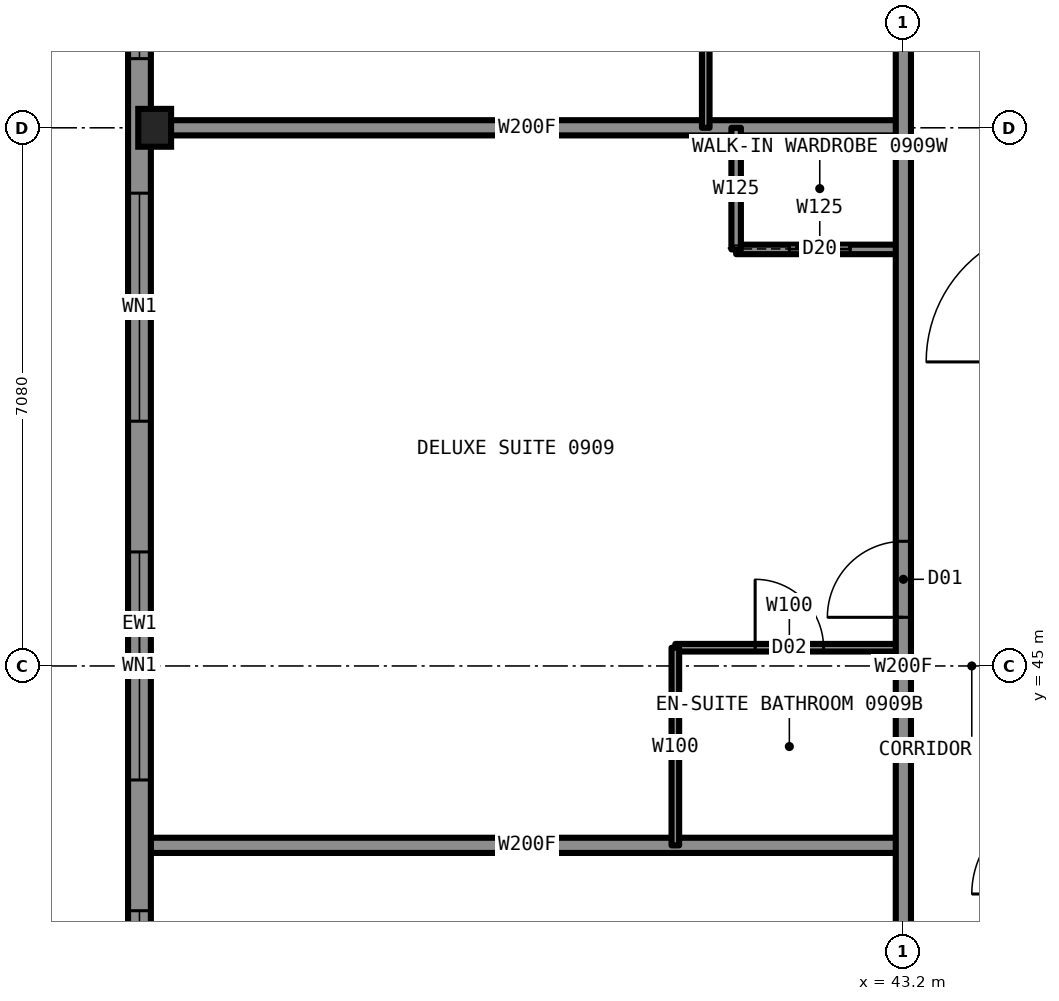
"""IFC4 building model, lengths in metres.
Left out: names, types, materials, properties, quantities, classifications, styles, units other than length and angle.
Written with IfcOpenShell. Run it as: python <this file> out.ifc"""

import sys

from ifc_helpers import new_model, si_unit, direction, frame, frame_2d, origin, origin_2d, place, context, subcontext, project, spatial, rectangle, i_section, extrude, element, fill, save


model = new_model("IFC4")
c1 = context("Model", 3, precision=1e-05, world=origin(), true_north=direction((0.0, 1.0)))
c2 = subcontext(c1, "Body", "Model", "MODEL_VIEW")
j1 = project(units=[si_unit("LENGTHUNIT", "METRE"), si_unit("PLANEANGLEUNIT", "RADIAN")], contexts=[c1])
p1 = place(None, origin())
s1 = spatial("IfcSite", under=j1, at=p1, CompositionType="ELEMENT")
p2 = place(p1, origin())
s2 = spatial("IfcBuilding", under=s1, at=p2, CompositionType="ELEMENT")
p3 = place(p2, frame((0.0, 0.0, 39.0)))
s3 = spatial("IfcBuildingStorey", under=s2, at=p3, CompositionType="ELEMENT", Elevation=39.0)
p4 = place(p3, frame((33.35, 52.08, 0.0), z_axis=(0.0, 0.0, 1.0), x_axis=(1.0, 0.0, 0.0)))
e1 = element("IfcColumn", 1, at=p4, inside=s3, PredefinedType="COLUMN", context=c2, shape_type="SweptSolid", body=[
    extrude(i_section(OverallWidth=0.432, OverallDepth=0.498, WebThickness=0.056, FlangeThickness=0.089, at=origin_2d()), origin(), (0.0, 0.0, 1.0), 3.5),
])
p5 = place(p3, frame((33.3, 42.64, 0.0), z_axis=(0.0, 0.0, 1.0), x_axis=(1.0, 0.0, 0.0)))
e2 = element("IfcWall", 2, at=p5, inside=s3, PredefinedType="PARTITIONING", context=c2, shape_type="SweptSolid", body=[
    extrude(rectangle(XDim=9.9, YDim=0.2, at=frame_2d((4.95, 0.0))), origin(), (0.0, 0.0, 1.0), 2.723),
])
p6 = place(p3, frame((40.2, 45.24, 0.0), z_axis=(0.0, 0.0, 1.0), x_axis=(1.0, 0.0, 0.0)))
e3 = element("IfcWall", 3, at=p6, inside=s3, PredefinedType="PARTITIONING", context=c2, shape_type="SweptSolid", body=[
    extrude(rectangle(XDim=3.0, YDim=0.1, at=frame_2d((1.5, 0.0))), origin(), (0.0, 0.0, 1.0), 3.33),
])
p7 = place(p6, frame((1.05, 0.0, 0.0)))
e4 = element("IfcOpeningElement", 4, at=p7, cuts=e3, PredefinedType="OPENING", context=c2, shape_type="SweptSolid", body=[
    extrude(rectangle(XDim=0.9, YDim=2.1, at=frame_2d((0.45, 1.05))), frame((0.0, 0.06, 0.0), z_axis=(0.0, -1.0, 0.0), x_axis=(1.0, 0.0, 0.0)), (0.0, 0.0, 1.0), 0.12),
])
p8 = place(p3, frame((41.0, 50.48, 0.0), z_axis=(0.0, 0.0, 1.0), x_axis=(1.0, 0.0, 0.0)))
e5 = element("IfcWall", 5, at=p8, inside=s3, PredefinedType="PARTITIONING", context=c2, shape_type="SweptSolid", body=[
    extrude(rectangle(XDim=2.2, YDim=0.125, at=frame_2d((1.1, 0.0))), origin(), (0.0, 0.0, 1.0), 3.33),
])
p9 = place(p8, frame((0.7, 0.0, 0.0)))
e6 = element("IfcOpeningElement", 6, at=p9, cuts=e5, PredefinedType="OPENING", context=c2, shape_type="SweptSolid", body=[
    extrude(rectangle(XDim=0.8, YDim=2.1, at=frame_2d((0.4, 1.05))), frame((0.0, 0.073, 0.0), z_axis=(0.0, -1.0, 0.0), x_axis=(1.0, 0.0, 0.0)), (0.0, 0.0, 1.0), 0.145),
])
p10 = place(p3, frame((33.3, 52.08, 0.0), z_axis=(0.0, 0.0, 1.0), x_axis=(1.0, 0.0, 0.0)))
e7 = element("IfcWall", 7, at=p10, inside=s3, PredefinedType="PARTITIONING", context=c2, shape_type="SweptSolid", body=[
    extrude(rectangle(XDim=9.9, YDim=0.2, at=frame_2d((4.95, 0.0))), origin(), (0.0, 0.0, 1.0), 2.573),
])
p11 = place(p3, frame((43.2, 33.2, 0.0), z_axis=(0.0, 0.0, 1.0), x_axis=(0.0, 1.0, 0.0)))
e8 = element("IfcWall", 8, at=p11, inside=s3, PredefinedType="PARTITIONING", context=c2, shape_type="SweptSolid", body=[
    extrude(rectangle(XDim=23.58, YDim=0.2, at=frame_2d((11.79, 0.0))), origin(), (0.0, 0.0, 1.0), 3.33),
])
p12 = place(p11, frame((7.27, 0.0, 0.0)))
e9 = element("IfcOpeningElement", 9, at=p12, cuts=e8, PredefinedType="OPENING", context=c2, shape_type="SweptSolid", body=[
    extrude(rectangle(XDim=1.0, YDim=2.2, at=frame_2d((0.5, 1.1))), frame((0.0, 0.11, 0.0), z_axis=(0.0, -1.0, 0.0), x_axis=(1.0, 0.0, 0.0)), (0.0, 0.0, 1.0), 0.22),
])
p13 = place(p11, frame((12.44, 0.0, 0.0)))
e10 = element("IfcOpeningElement", 10, at=p13, cuts=e8, PredefinedType="OPENING", context=c2, shape_type="SweptSolid", body=[
    extrude(rectangle(XDim=1.0, YDim=2.2, at=frame_2d((0.5, 1.1))), frame((0.0, 0.11, 0.0), z_axis=(0.0, -1.0, 0.0), x_axis=(1.0, 0.0, 0.0)), (0.0, 0.0, 1.0), 0.22),
])
p14 = place(p11, frame((21.84, 0.0, 0.0)))
e11 = element("IfcOpeningElement", 11, at=p14, cuts=e8, PredefinedType="OPENING", context=c2, shape_type="SweptSolid", body=[
    extrude(rectangle(XDim=1.1, YDim=2.2, at=frame_2d((0.55, 1.1))), frame((0.0, 0.11, 0.0), z_axis=(0.0, -1.0, 0.0), x_axis=(1.0, 0.0, 0.0)), (0.0, 0.0, 1.0), 0.22),
])
p15 = place(p11, frame((0.66, 0.0, 0.0)))
e12 = element("IfcOpeningElement", 12, at=p15, cuts=e8, PredefinedType="OPENING", context=c2, shape_type="SweptSolid", body=[
    extrude(rectangle(XDim=1.1, YDim=2.2, at=frame_2d((0.55, 1.1))), frame((0.0, 0.11, 0.0), z_axis=(0.0, -1.0, 0.0), x_axis=(1.0, 0.0, 0.0)), (0.0, 0.0, 1.0), 0.22),
])
p16 = place(p3, frame((41.0, 50.48, 0.0), z_axis=(0.0, 0.0, 1.0), x_axis=(0.0, 1.0, 0.0)))
e13 = element("IfcWall", 13, at=p16, inside=s3, PredefinedType="PARTITIONING", context=c2, shape_type="SweptSolid", body=[
    extrude(rectangle(XDim=1.6, YDim=0.125, at=frame_2d((0.8, 0.0))), origin(), (0.0, 0.0, 1.0), 3.33),
])
p17 = place(p3, frame((40.6, 52.08, 0.0), z_axis=(0.0, 0.0, 1.0), x_axis=(0.0, 1.0, 0.0)))
e14 = element("IfcWall", 14, at=p17, inside=s3, PredefinedType="PARTITIONING", context=c2, shape_type="SweptSolid", body=[
    extrude(rectangle(XDim=2.6, YDim=0.1, at=frame_2d((1.3, 0.0))), origin(), (0.0, 0.0, 1.0), 3.33),
])
p18 = place(p3, frame((40.2, 42.64, 0.0), z_axis=(0.0, 0.0, 1.0), x_axis=(0.0, 1.0, 0.0)))
e15 = element("IfcWall", 15, at=p18, inside=s3, PredefinedType="PARTITIONING", context=c2, shape_type="SweptSolid", body=[
    extrude(rectangle(XDim=2.6, YDim=0.1, at=frame_2d((1.3, 0.0))), origin(), (0.0, 0.0, 1.0), 3.33),
])
p19 = place(p3, frame((33.15, 61.5, 0.0), z_axis=(0.0, 0.0, 1.0), x_axis=(0.0, -1.0, 0.0)))
e16 = element("IfcWall", 16, at=p19, inside=s3, PredefinedType="SOLIDWALL", context=c2, shape_type="SweptSolid", body=[
    extrude(rectangle(XDim=33.0, YDim=0.3, at=frame_2d((16.5, 0.0))), origin(), (0.0, 0.0, 1.0), 2.83),
])
p20 = place(p19, frame((0.85, 0.0, 0.5)))
e17 = element("IfcOpeningElement", 17, at=p20, cuts=e16, PredefinedType="OPENING", context=c2, shape_type="SweptSolid", body=[
    extrude(rectangle(XDim=2.5, YDim=2.0, at=frame_2d((1.25, 1.0))), frame((0.0, 0.16, 0.0), z_axis=(0.0, -1.0, 0.0), x_axis=(1.0, 0.0, 0.0)), (0.0, 0.0, 1.0), 0.32),
])
p21 = place(p19, frame((6.61, 0.0, 0.5)))
e18 = element("IfcOpeningElement", 18, at=p21, cuts=e16, PredefinedType="OPENING", context=c2, shape_type="SweptSolid", body=[
    extrude(rectangle(XDim=1.9, YDim=1.9, at=frame_2d((0.95, 0.95))), frame((0.0, 0.16, 0.0), z_axis=(0.0, -1.0, 0.0), x_axis=(1.0, 0.0, 0.0)), (0.0, 0.0, 1.0), 0.32),
])
p22 = place(p19, frame((10.28, 0.0, 0.5)))
e19 = element("IfcOpeningElement", 19, at=p22, cuts=e16, PredefinedType="OPENING", context=c2, shape_type="SweptSolid", body=[
    extrude(rectangle(XDim=3.0, YDim=2.0, at=frame_2d((1.5, 1.0))), frame((0.0, 0.16, 0.0), z_axis=(0.0, -1.0, 0.0), x_axis=(1.0, 0.0, 0.0)), (0.0, 0.0, 1.0), 0.32),
])
p23 = place(p19, frame((15.0, 0.0, 0.5)))
e20 = element("IfcOpeningElement", 20, at=p23, cuts=e16, PredefinedType="OPENING", context=c2, shape_type="SweptSolid", body=[
    extrude(rectangle(XDim=3.0, YDim=2.0, at=frame_2d((1.5, 1.0))), frame((0.0, 0.16, 0.0), z_axis=(0.0, -1.0, 0.0), x_axis=(1.0, 0.0, 0.0)), (0.0, 0.0, 1.0), 0.32),
])
p24 = place(p19, frame((19.72, 0.0, 0.5)))
e21 = element("IfcOpeningElement", 21, at=p24, cuts=e16, PredefinedType="OPENING", context=c2, shape_type="SweptSolid", body=[
    extrude(rectangle(XDim=3.0, YDim=2.0, at=frame_2d((1.5, 1.0))), frame((0.0, 0.16, 0.0), z_axis=(0.0, -1.0, 0.0), x_axis=(1.0, 0.0, 0.0)), (0.0, 0.0, 1.0), 0.32),
])
p25 = place(p19, frame((24.44, 0.0, 0.5)))
e22 = element("IfcOpeningElement", 22, at=p25, cuts=e16, PredefinedType="OPENING", context=c2, shape_type="SweptSolid", body=[
    extrude(rectangle(XDim=1.9, YDim=1.9, at=frame_2d((0.95, 0.95))), frame((0.0, 0.16, 0.0), z_axis=(0.0, -1.0, 0.0), x_axis=(1.0, 0.0, 0.0)), (0.0, 0.0, 1.0), 0.32),
])
p26 = place(p19, frame((29.6, 0.0, 0.5)))
e23 = element("IfcOpeningElement", 23, at=p26, cuts=e16, PredefinedType="OPENING", context=c2, shape_type="SweptSolid", body=[
    extrude(rectangle(XDim=2.5, YDim=2.0, at=frame_2d((1.25, 1.0))), frame((0.0, 0.16, 0.0), z_axis=(0.0, -1.0, 0.0), x_axis=(1.0, 0.0, 0.0)), (0.0, 0.0, 1.0), 0.32),
])
p27 = place(p19, frame((5.91, 0.0, 0.5)))
e24 = element("IfcOpeningElement", 24, at=p27, cuts=e16, PredefinedType="OPENING", context=c2, shape_type="SweptSolid", body=[
    extrude(rectangle(XDim=0.7, YDim=1.0, at=frame_2d((0.35, 0.5))), frame((0.0, 0.16, 0.0), z_axis=(0.0, -1.0, 0.0), x_axis=(1.0, 0.0, 0.0)), (0.0, 0.0, 1.0), 0.32),
])
p28 = place(p19, frame((26.39, 0.0, 0.5)))
e25 = element("IfcOpeningElement", 25, at=p28, cuts=e16, PredefinedType="OPENING", context=c2, shape_type="SweptSolid", body=[
    extrude(rectangle(XDim=0.7, YDim=1.0, at=frame_2d((0.35, 0.5))), frame((0.0, 0.16, 0.0), z_axis=(0.0, -1.0, 0.0), x_axis=(1.0, 0.0, 0.0)), (0.0, 0.0, 1.0), 0.32),
])
p29 = place(p13, origin())
e26 = element("IfcDoor", 26, at=p29, inside=s3, OperationType="SINGLE_SWING_LEFT", PredefinedType="DOOR", context=c2, shape_type="SweptSolid", body=[
    extrude(rectangle(XDim=1.0, YDim=2.2, at=frame_2d((0.5, 1.1))), frame((0.0, 0.025, 0.0), z_axis=(0.0, -1.0, 0.0), x_axis=(1.0, 0.0, 0.0)), (0.0, 0.0, 1.0), 0.05),
])
fill(e10, e26)
p30 = place(p7, origin())
e27 = element("IfcDoor", 27, at=p30, inside=s3, OperationType="SINGLE_SWING_RIGHT", PredefinedType="DOOR", context=c2, shape_type="SweptSolid", body=[
    extrude(rectangle(XDim=0.9, YDim=2.1, at=frame_2d((0.45, 1.05))), frame((0.0, 0.025, 0.0), z_axis=(0.0, -1.0, 0.0), x_axis=(1.0, 0.0, 0.0)), (0.0, 0.0, 1.0), 0.05),
])
fill(e4, e27)
p31 = place(p9, origin())
e28 = element("IfcDoor", 28, at=p31, inside=s3, OperationType="SLIDING_TO_LEFT", PredefinedType="DOOR", context=c2, shape_type="SweptSolid", body=[
    extrude(rectangle(XDim=0.8, YDim=2.1, at=frame_2d((0.4, 1.05))), frame((0.0, 0.025, 0.0), z_axis=(0.0, -1.0, 0.0), x_axis=(1.0, 0.0, 0.0)), (0.0, 0.0, 1.0), 0.05),
])
fill(e6, e28)
p32 = place(p21, origin())
e29 = element("IfcWindow", 29, at=p32, inside=s3, PartitioningType="SINGLE_PANEL", PredefinedType="WINDOW", context=c2, shape_type="SweptSolid", body=[
    extrude(rectangle(XDim=1.9, YDim=1.9, at=frame_2d((0.95, 0.95))), frame((0.0, 0.03, 0.0), z_axis=(0.0, -1.0, 0.0), x_axis=(1.0, 0.0, 0.0)), (0.0, 0.0, 1.0), 0.06),
])
fill(e18, e29)
p33 = place(p22, origin())
e30 = element("IfcWindow", 30, at=p33, inside=s3, PartitioningType="SINGLE_PANEL", PredefinedType="WINDOW", context=c2, shape_type="SweptSolid", body=[
    extrude(rectangle(XDim=3.0, YDim=2.0, at=frame_2d((1.5, 1.0))), frame((0.0, 0.03, 0.0), z_axis=(0.0, -1.0, 0.0), x_axis=(1.0, 0.0, 0.0)), (0.0, 0.0, 1.0), 0.06),
])
fill(e19, e30)
p34 = place(p23, origin())
e31 = element("IfcWindow", 31, at=p34, inside=s3, PartitioningType="SINGLE_PANEL", PredefinedType="WINDOW", context=c2, shape_type="SweptSolid", body=[
    extrude(rectangle(XDim=3.0, YDim=2.0, at=frame_2d((1.5, 1.0))), frame((0.0, 0.03, 0.0), z_axis=(0.0, -1.0, 0.0), x_axis=(1.0, 0.0, 0.0)), (0.0, 0.0, 1.0), 0.06),
])
fill(e20, e31)
p35 = place(p24, origin())
e32 = element("IfcWindow", 32, at=p35, inside=s3, PartitioningType="SINGLE_PANEL", PredefinedType="WINDOW", context=c2, shape_type="SweptSolid", body=[
    extrude(rectangle(XDim=3.0, YDim=2.0, at=frame_2d((1.5, 1.0))), frame((0.0, 0.03, 0.0), z_axis=(0.0, -1.0, 0.0), x_axis=(1.0, 0.0, 0.0)), (0.0, 0.0, 1.0), 0.06),
])
fill(e21, e32)
save(model, sys.argv[1])
